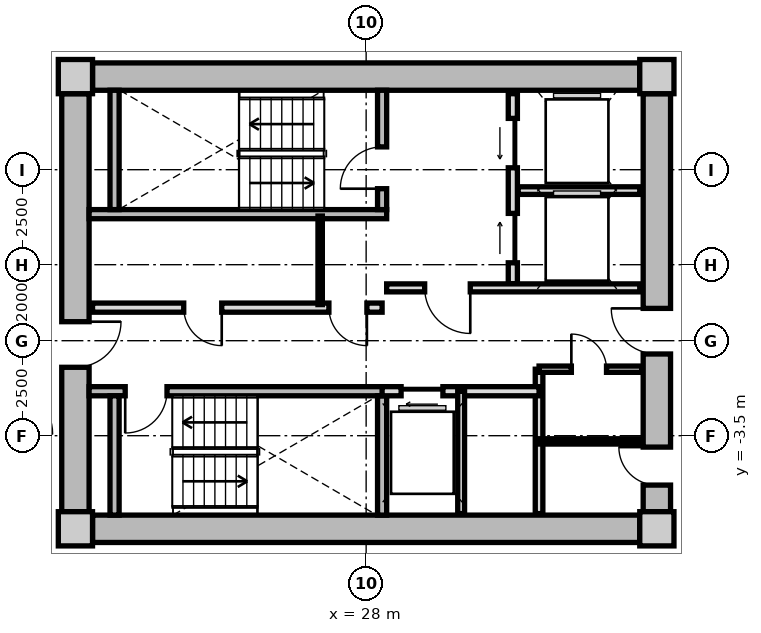
"""IFC4 building model, lengths in metres.
Left out: names, types, materials, properties, quantities, classifications, styles, units other than length and angle.
Written with IfcOpenShell. Run it as: python <this file> out.ifc"""

import sys

from ifc_helpers import new_model, si_unit, direction, frame, frame_2d, origin, origin_2d, place, context, subcontext, project, spatial, rectangle, extrude, source, transform, mapped, element, fill, save


model = new_model("IFC4")
c1 = context("Model", 3, precision=1e-05, world=origin(), true_north=direction((0.0, 1.0)))
c2 = subcontext(c1, "Body", "Model", "MODEL_VIEW")
j1 = project(units=[si_unit("LENGTHUNIT", "METRE"), si_unit("PLANEANGLEUNIT", "RADIAN")], contexts=[c1])
p1 = place(None, origin())
s1 = spatial("IfcSite", under=j1, at=p1, CompositionType="ELEMENT")
p2 = place(p1, origin())
s2 = spatial("IfcBuilding", under=s1, at=p2, CompositionType="ELEMENT")
p3 = place(p2, frame((0.0, 0.0, 114.55)))
s3 = spatial("IfcBuildingStorey", under=s2, at=p3, CompositionType="ELEMENT", Elevation=114.55)
m1 = source(origin(), c2, "Body", "SweptSolid", [
    extrude(rectangle(XDim=0.9, YDim=0.9, at=origin_2d()), origin(), (0.0, 0.0, 1.0), 3.05),
])
for number, where, z_axis, x_axis in (
    (1, (20.35, -5.95, 0.0), (0.0, 0.0, 1.0), (1.0, 0.0, 0.0)),
    (2, (35.65, -5.95, 0.0), (0.0, 0.0, 1.0), (1.0, 0.0, 0.0)),
    (3, (35.65, 5.95, 0.0), (0.0, 0.0, 1.0), (1.0, 0.0, 0.0)),
    (4, (20.35, 5.95, 0.0), (0.0, 0.0, 1.0), (1.0, 0.0, 0.0)),
):
    element("IfcColumn", number, at=place(p3, frame(where, z_axis=z_axis, x_axis=x_axis)), inside=s3, PredefinedType="COLUMN", context=c2, shape_type="MappedRepresentation", body=[
        mapped(m1, transform((0.0, 0.0, 0.0), x_axis=(1.0, 0.0, 0.0), y_axis=(0.0, 1.0, 0.0), z_axis=(0.0, 0.0, 1.0), scale=1.0)),
    ])
m2 = source(origin(), c2, "Body", "SweptSolid", [
    extrude(rectangle(XDim=14.4, YDim=0.72, at=frame_2d((7.2, 0.0))), origin(), (0.0, 0.0, 1.0), 2.79),
])
for number, where, z_axis, x_axis in (
    (5, (20.8, 5.95, 0.0), (0.0, 0.0, 1.0), (1.0, 0.0, 0.0)),
    (6, (35.2, -5.95, 0.0), (0.0, 0.0, 1.0), (-1.0, 0.0, 0.0)),
):
    element("IfcWall", number, at=place(p3, frame(where, z_axis=z_axis, x_axis=x_axis)), inside=s3, PredefinedType="SHEAR", context=c2, shape_type="MappedRepresentation", body=[
        mapped(m2, transform((0.0, 0.0, 0.0), x_axis=(1.0, 0.0, 0.0), y_axis=(0.0, 1.0, 0.0), z_axis=(0.0, 0.0, 1.0), scale=1.0)),
    ])
m3 = source(origin(), c2, "Body", "SweptSolid", [
    extrude(rectangle(XDim=11.0, YDim=0.72, at=frame_2d((5.5, 0.0))), origin(), (0.0, 0.0, 1.0), 2.79),
])
p4 = place(p3, frame((20.35, -5.5, 0.0), z_axis=(0.0, 0.0, 1.0), x_axis=(0.0, 1.0, 0.0)))
e7 = element("IfcWall", 7, at=p4, inside=s3, PredefinedType="SHEAR", context=c2, shape_type="MappedRepresentation", body=[
    mapped(m3, transform((0.0, 0.0, 0.0), x_axis=(1.0, 0.0, 0.0), y_axis=(0.0, 1.0, 0.0), z_axis=(0.0, 0.0, 1.0), scale=1.0)),
])
p5 = place(p4, frame((3.8, 0.0, 0.0)))
e8 = element("IfcOpeningElement", 8, at=p5, cuts=e7, PredefinedType="OPENING", context=c2, shape_type="SweptSolid", body=[
    extrude(rectangle(XDim=1.2, YDim=2.15, at=frame_2d((0.6, 1.075))), frame((0.0, 0.37, 0.0), z_axis=(0.0, -1.0, 0.0), x_axis=(1.0, 0.0, 0.0)), (0.0, 0.0, 1.0), 0.74),
])
p6 = place(p3, frame((35.65, 5.5, 0.0), z_axis=(0.0, 0.0, 1.0), x_axis=(0.0, -1.0, 0.0)))
e9 = element("IfcWall", 9, at=p6, inside=s3, PredefinedType="SHEAR", context=c2, shape_type="MappedRepresentation", body=[
    mapped(m3, transform((0.0, 0.0, 0.0), x_axis=(1.0, 0.0, 0.0), y_axis=(0.0, 1.0, 0.0), z_axis=(0.0, 0.0, 1.0), scale=1.0)),
])
p7 = place(p6, frame((5.65, 0.0, 0.0)))
e10 = element("IfcOpeningElement", 10, at=p7, cuts=e9, PredefinedType="OPENING", context=c2, shape_type="SweptSolid", body=[
    extrude(rectangle(XDim=1.2, YDim=2.15, at=frame_2d((0.6, 1.075))), frame((0.0, 0.37, 0.0), z_axis=(0.0, -1.0, 0.0), x_axis=(1.0, 0.0, 0.0)), (0.0, 0.0, 1.0), 0.74),
])
p8 = place(p6, frame((9.3, 0.0, 0.0)))
e11 = element("IfcOpeningElement", 11, at=p8, cuts=e9, PredefinedType="OPENING", context=c2, shape_type="SweptSolid", body=[
    extrude(rectangle(XDim=1.0, YDim=2.1, at=frame_2d((0.5, 1.05))), frame((0.0, 0.37, 0.0), z_axis=(0.0, -1.0, 0.0), x_axis=(1.0, 0.0, 0.0)), (0.0, 0.0, 1.0), 0.74),
])
m4 = source(origin(), c2, "Body", "SweptSolid", [
    extrude(rectangle(XDim=7.83, YDim=0.24, at=frame_2d((3.915, 0.0))), origin(), (0.0, 0.0, 1.0), 2.79),
])
p9 = place(p3, frame((20.71, 2.33, 0.0), z_axis=(0.0, 0.0, 1.0), x_axis=(1.0, 0.0, 0.0)))
e12 = element("IfcWall", 12, at=p9, inside=s3, PredefinedType="PARTITIONING", context=c2, shape_type="MappedRepresentation", body=[
    mapped(m4, transform((0.0, 0.0, 0.0), x_axis=(1.0, 0.0, 0.0), y_axis=(0.0, 1.0, 0.0), z_axis=(0.0, 0.0, 1.0), scale=1.0)),
])
m5 = source(origin(), c2, "Body", "SweptSolid", [
    extrude(rectangle(XDim=3.14, YDim=0.24, at=frame_2d((1.57, 0.0))), origin(), (0.0, 0.0, 1.0), 2.79),
])
p10 = place(p3, frame((21.38, 2.45, 0.0), z_axis=(0.0, 0.0, 1.0), x_axis=(0.0, 1.0, 0.0)))
e13 = element("IfcWall", 13, at=p10, inside=s3, PredefinedType="PARTITIONING", context=c2, shape_type="MappedRepresentation", body=[
    mapped(m5, transform((0.0, 0.0, 0.0), x_axis=(1.0, 0.0, 0.0), y_axis=(0.0, 1.0, 0.0), z_axis=(0.0, 0.0, 1.0), scale=1.0)),
])
p11 = place(p3, frame((28.42, 2.45, 0.0), z_axis=(0.0, 0.0, 1.0), x_axis=(0.0, 1.0, 0.0)))
e14 = element("IfcWall", 14, at=p11, inside=s3, PredefinedType="PARTITIONING", context=c2, shape_type="MappedRepresentation", body=[
    mapped(m5, transform((0.0, 0.0, 0.0), x_axis=(1.0, 0.0, 0.0), y_axis=(0.0, 1.0, 0.0), z_axis=(0.0, 0.0, 1.0), scale=1.0)),
])
p12 = place(p11, frame((0.55, 0.0, 0.0)))
e15 = element("IfcOpeningElement", 15, at=p12, cuts=e14, PredefinedType="OPENING", context=c2, shape_type="SweptSolid", body=[
    extrude(rectangle(XDim=1.1, YDim=2.15, at=frame_2d((0.55, 1.075))), frame((0.0, 0.13, 0.0), z_axis=(0.0, -1.0, 0.0), x_axis=(1.0, 0.0, 0.0)), (0.0, 0.0, 1.0), 0.26),
])
p13 = place(p3, frame((20.71, -2.33, 0.0), z_axis=(0.0, 0.0, 1.0), x_axis=(1.0, 0.0, 0.0)))
e16 = element("IfcWall", 16, at=p13, inside=s3, PredefinedType="PARTITIONING", context=c2, shape_type="MappedRepresentation", body=[
    mapped(m4, transform((0.0, 0.0, 0.0), x_axis=(1.0, 0.0, 0.0), y_axis=(0.0, 1.0, 0.0), z_axis=(0.0, 0.0, 1.0), scale=1.0)),
])
p14 = place(p13, frame((0.95, 0.0, 0.0)))
e17 = element("IfcOpeningElement", 17, at=p14, cuts=e16, PredefinedType="OPENING", context=c2, shape_type="SweptSolid", body=[
    extrude(rectangle(XDim=1.1, YDim=2.15, at=frame_2d((0.55, 1.075))), frame((0.0, 0.13, 0.0), z_axis=(0.0, -1.0, 0.0), x_axis=(1.0, 0.0, 0.0)), (0.0, 0.0, 1.0), 0.26),
])
for number, where, z_axis, x_axis in (
    (18, (21.38, -5.59, 0.0), (0.0, 0.0, 1.0), (0.0, 1.0, 0.0)),
    (19, (28.42, -5.59, 0.0), (0.0, 0.0, 1.0), (0.0, 1.0, 0.0)),
):
    element("IfcWall", number, at=place(p3, frame(where, z_axis=z_axis, x_axis=x_axis)), inside=s3, PredefinedType="PARTITIONING", context=c2, shape_type="MappedRepresentation", body=[
        mapped(m5, transform((0.0, 0.0, 0.0), x_axis=(1.0, 0.0, 0.0), y_axis=(0.0, 1.0, 0.0), z_axis=(0.0, 0.0, 1.0), scale=1.0)),
    ])
m6 = source(origin(), c2, "Body", "SweptSolid", [
    extrude(rectangle(XDim=5.0, YDim=0.24, at=frame_2d((2.5, 0.0))), origin(), (0.0, 0.0, 1.0), 2.775),
])
p15 = place(p3, frame((31.86, 0.5, 0.0), z_axis=(0.0, 0.0, 1.0), x_axis=(0.0, 1.0, 0.0)))
e20 = element("IfcWall", 20, at=p15, inside=s3, PredefinedType="PARTITIONING", context=c2, shape_type="MappedRepresentation", body=[
    mapped(m6, transform((0.0, 0.0, 0.0), x_axis=(1.0, 0.0, 0.0), y_axis=(0.0, 1.0, 0.0), z_axis=(0.0, 0.0, 1.0), scale=1.0)),
])
p16 = place(p15, frame((3.05, 0.0, 0.0)))
e21 = element("IfcOpeningElement", 21, at=p16, cuts=e20, PredefinedType="OPENING", context=c2, shape_type="SweptSolid", body=[
    extrude(rectangle(XDim=1.3, YDim=2.2, at=frame_2d((0.65, 1.1))), frame((0.0, 0.13, 0.0), z_axis=(0.0, -1.0, 0.0), x_axis=(1.0, 0.0, 0.0)), (0.0, 0.0, 1.0), 0.26),
])
p17 = place(p15, frame((0.55, 0.0, 0.0)))
e22 = element("IfcOpeningElement", 22, at=p17, cuts=e20, PredefinedType="OPENING", context=c2, shape_type="SweptSolid", body=[
    extrude(rectangle(XDim=1.3, YDim=2.2, at=frame_2d((0.65, 1.1))), frame((0.0, 0.13, 0.0), z_axis=(0.0, -1.0, 0.0), x_axis=(1.0, 0.0, 0.0)), (0.0, 0.0, 1.0), 0.26),
])
m7 = source(origin(), c2, "Body", "SweptSolid", [
    extrude(rectangle(XDim=3.2, YDim=0.2, at=frame_2d((1.6, 0.0))), origin(), (0.0, 0.0, 1.0), 2.775),
])
p18 = place(p3, frame((32.0, 2.95, 0.0), z_axis=(0.0, 0.0, 1.0), x_axis=(1.0, 0.0, 0.0)))
e23 = element("IfcWall", 23, at=p18, inside=s3, PredefinedType="PARTITIONING", context=c2, shape_type="MappedRepresentation", body=[
    mapped(m7, transform((0.0, 0.0, 0.0), x_axis=(1.0, 0.0, 0.0), y_axis=(0.0, 1.0, 0.0), z_axis=(0.0, 0.0, 1.0), scale=1.0)),
])
m8 = source(origin(), c2, "Body", "SweptSolid", [
    extrude(rectangle(XDim=6.66, YDim=0.21, at=frame_2d((3.33, 0.0))), origin(), (0.0, 0.0, 1.0), 2.775),
])
p19 = place(p3, frame((28.54, 0.39, 0.0), z_axis=(0.0, 0.0, 1.0), x_axis=(1.0, 0.0, 0.0)))
e24 = element("IfcWall", 24, at=p19, inside=s3, PredefinedType="PARTITIONING", context=c2, shape_type="MappedRepresentation", body=[
    mapped(m8, transform((0.0, 0.0, 0.0), x_axis=(1.0, 0.0, 0.0), y_axis=(0.0, 1.0, 0.0), z_axis=(0.0, 0.0, 1.0), scale=1.0)),
])
p20 = place(p19, frame((1.0, 0.0, 0.0)))
e25 = element("IfcOpeningElement", 25, at=p20, cuts=e24, PredefinedType="OPENING", context=c2, shape_type="SweptSolid", body=[
    extrude(rectangle(XDim=1.2, YDim=2.15, at=frame_2d((0.6, 1.075))), frame((0.0, 0.115, 0.0), z_axis=(0.0, -1.0, 0.0), x_axis=(1.0, 0.0, 0.0)), (0.0, 0.0, 1.0), 0.23),
])
m9 = source(origin(), c2, "Body", "SweptSolid", [
    extrude(rectangle(XDim=7.62, YDim=0.24, at=frame_2d((3.81, 0.0))), origin(), (0.0, 0.0, 1.0), 2.775),
])
p21 = place(p3, frame((20.8, -0.13, 0.0), z_axis=(0.0, 0.0, 1.0), x_axis=(1.0, 0.0, 0.0)))
e26 = element("IfcWall", 26, at=p21, inside=s3, PredefinedType="PARTITIONING", context=c2, shape_type="MappedRepresentation", body=[
    mapped(m9, transform((0.0, 0.0, 0.0), x_axis=(1.0, 0.0, 0.0), y_axis=(0.0, 1.0, 0.0), z_axis=(0.0, 0.0, 1.0), scale=1.0)),
])
p22 = place(p21, frame((6.22, 0.0, 0.0)))
e27 = element("IfcOpeningElement", 27, at=p22, cuts=e26, PredefinedType="OPENING", context=c2, shape_type="SweptSolid", body=[
    extrude(rectangle(XDim=1.0, YDim=2.1, at=frame_2d((0.5, 1.05))), frame((0.0, 0.13, 0.0), z_axis=(0.0, -1.0, 0.0), x_axis=(1.0, 0.0, 0.0)), (0.0, 0.0, 1.0), 0.26),
])
p23 = place(p21, frame((2.4, 0.0, 0.0)))
e28 = element("IfcOpeningElement", 28, at=p23, cuts=e26, PredefinedType="OPENING", context=c2, shape_type="SweptSolid", body=[
    extrude(rectangle(XDim=1.0, YDim=2.1, at=frame_2d((0.5, 1.05))), frame((0.0, 0.13, 0.0), z_axis=(0.0, -1.0, 0.0), x_axis=(1.0, 0.0, 0.0)), (0.0, 0.0, 1.0), 0.26),
])
m10 = source(origin(), c2, "Body", "SweptSolid", [
    extrude(rectangle(XDim=2.33, YDim=0.115, at=frame_2d((1.165, 0.0))), origin(), (0.0, 0.0, 1.0), 2.775),
])
p24 = place(p3, frame((26.79, -0.05, 0.0), z_axis=(0.0, 0.0, 1.0), x_axis=(0.0, 1.0, 0.0)))
e29 = element("IfcWall", 29, at=p24, inside=s3, PredefinedType="PARTITIONING", context=c2, shape_type="MappedRepresentation", body=[
    mapped(m10, transform((0.0, 0.0, 0.0), x_axis=(1.0, 0.0, 0.0), y_axis=(0.0, 1.0, 0.0), z_axis=(0.0, 0.0, 1.0), scale=1.0)),
])
m11 = source(origin(), c2, "Body", "SweptSolid", [
    extrude(rectangle(XDim=3.8, YDim=0.2, at=frame_2d((1.9, 0.0))), origin(), (0.0, 0.0, 1.0), 2.775),
])
p25 = place(p3, frame((32.55, -5.55, 0.0), z_axis=(0.0, 0.0, 1.0), x_axis=(0.0, 1.0, 0.0)))
e30 = element("IfcWall", 30, at=p25, inside=s3, PredefinedType="PARTITIONING", context=c2, shape_type="MappedRepresentation", body=[
    mapped(m11, transform((0.0, 0.0, 0.0), x_axis=(1.0, 0.0, 0.0), y_axis=(0.0, 1.0, 0.0), z_axis=(0.0, 0.0, 1.0), scale=1.0)),
])
m12 = source(origin(), c2, "Body", "SweptSolid", [
    extrude(rectangle(XDim=4.13, YDim=0.24, at=frame_2d((2.065, 0.0))), origin(), (0.0, 0.0, 1.0), 2.775),
])
p26 = place(p3, frame((28.42, -2.33, 0.0), z_axis=(0.0, 0.0, 1.0), x_axis=(1.0, 0.0, 0.0)))
e31 = element("IfcWall", 31, at=p26, inside=s3, PredefinedType="PARTITIONING", context=c2, shape_type="MappedRepresentation", body=[
    mapped(m12, transform((0.0, 0.0, 0.0), x_axis=(1.0, 0.0, 0.0), y_axis=(0.0, 1.0, 0.0), z_axis=(0.0, 0.0, 1.0), scale=1.0)),
])
p27 = place(p26, frame((0.5, 0.0, 0.0)))
e32 = element("IfcOpeningElement", 32, at=p27, cuts=e31, PredefinedType="OPENING", context=c2, shape_type="SweptSolid", body=[
    extrude(rectangle(XDim=1.1, YDim=2.2, at=frame_2d((0.55, 1.1))), frame((0.0, 0.13, 0.0), z_axis=(0.0, -1.0, 0.0), x_axis=(1.0, 0.0, 0.0)), (0.0, 0.0, 1.0), 0.26),
])
m13 = source(origin(), c2, "Body", "SweptSolid", [
    extrude(rectangle(XDim=3.22, YDim=0.18, at=frame_2d((1.61, 0.0))), origin(), (0.0, 0.0, 1.0), 2.775),
])
p28 = place(p3, frame((30.5, -5.55, 0.0), z_axis=(0.0, 0.0, 1.0), x_axis=(0.0, 1.0, 0.0)))
e33 = element("IfcWall", 33, at=p28, inside=s3, PredefinedType="PARTITIONING", context=c2, shape_type="MappedRepresentation", body=[
    mapped(m13, transform((0.0, 0.0, 0.0), x_axis=(1.0, 0.0, 0.0), y_axis=(0.0, 1.0, 0.0), z_axis=(0.0, 0.0, 1.0), scale=1.0)),
])
m14 = source(origin(), c2, "Body", "SweptSolid", [
    extrude(rectangle(XDim=2.7, YDim=0.165, at=frame_2d((1.35, 0.0))), origin(), (0.0, 0.0, 1.0), 2.775),
])
p29 = place(p3, frame((32.55, -1.75, 0.0), z_axis=(0.0, 0.0, 1.0), x_axis=(1.0, 0.0, 0.0)))
e34 = element("IfcWall", 34, at=p29, inside=s3, PredefinedType="PARTITIONING", context=c2, shape_type="MappedRepresentation", body=[
    mapped(m14, transform((0.0, 0.0, 0.0), x_axis=(1.0, 0.0, 0.0), y_axis=(0.0, 1.0, 0.0), z_axis=(0.0, 0.0, 1.0), scale=1.0)),
])
p30 = place(p29, frame((0.85, 0.0, 0.0)))
e35 = element("IfcOpeningElement", 35, at=p30, cuts=e34, PredefinedType="OPENING", context=c2, shape_type="SweptSolid", body=[
    extrude(rectangle(XDim=0.925, YDim=2.1, at=frame_2d((0.462, 1.05))), frame((0.0, 0.093, 0.0), z_axis=(0.0, -1.0, 0.0), x_axis=(1.0, 0.0, 0.0)), (0.0, 0.0, 1.0), 0.185),
])
m15 = source(origin(), c2, "Body", "SweptSolid", [
    extrude(rectangle(XDim=2.7, YDim=0.14, at=frame_2d((1.35, 0.0))), origin(), (0.0, 0.0, 1.0), 2.775),
])
p31 = place(p3, frame((32.55, -3.65, 0.0), z_axis=(0.0, 0.0, 1.0), x_axis=(1.0, 0.0, 0.0)))
e36 = element("IfcWall", 36, at=p31, inside=s3, PredefinedType="PARTITIONING", context=c2, shape_type="MappedRepresentation", body=[
    mapped(m15, transform((0.0, 0.0, 0.0), x_axis=(1.0, 0.0, 0.0), y_axis=(0.0, 1.0, 0.0), z_axis=(0.0, 0.0, 1.0), scale=1.0)),
])
m16 = source(origin(), c2, "Body", "SweptSolid", [
    extrude(rectangle(XDim=1.1, YDim=2.15, at=frame_2d((0.55, 1.075))), frame((0.0, 0.025, 0.0), z_axis=(0.0, -1.0, 0.0), x_axis=(1.0, 0.0, 0.0)), (0.0, 0.0, 1.0), 0.05),
])
p32 = place(p12, origin())
e37 = element("IfcDoor", 37, at=p32, inside=s3, OperationType="SINGLE_SWING_LEFT", PredefinedType="DOOR", context=c2, shape_type="MappedRepresentation", body=[
    mapped(m16, transform((0.0, 0.0, 0.0), x_axis=(1.0, 0.0, 0.0), y_axis=(0.0, 1.0, 0.0), z_axis=(0.0, 0.0, 1.0), scale=1.0)),
])
fill(e15, e37)
p33 = place(p14, frame((1.1, 0.0, 0.0), z_axis=(0.0, 0.0, 1.0), x_axis=(-1.0, 0.0, 0.0)))
e38 = element("IfcDoor", 38, at=p33, inside=s3, OperationType="SINGLE_SWING_RIGHT", PredefinedType="DOOR", context=c2, shape_type="MappedRepresentation", body=[
    mapped(m16, transform((0.0, 0.0, 0.0), x_axis=(1.0, 0.0, 0.0), y_axis=(0.0, 1.0, 0.0), z_axis=(0.0, 0.0, 1.0), scale=1.0)),
])
fill(e17, e38)
m17 = source(origin(), c2, "Body", "SweptSolid", [
    extrude(rectangle(XDim=1.3, YDim=2.2, at=frame_2d((0.65, 1.1))), frame((0.0, 0.025, 0.0), z_axis=(0.0, -1.0, 0.0), x_axis=(1.0, 0.0, 0.0)), (0.0, 0.0, 1.0), 0.05),
])
p34 = place(p16, origin())
e39 = element("IfcDoor", 39, at=p34, inside=s3, OperationType="SLIDING_TO_LEFT", PredefinedType="DOOR", context=c2, shape_type="MappedRepresentation", body=[
    mapped(m17, transform((0.0, 0.0, 0.0), x_axis=(1.0, 0.0, 0.0), y_axis=(0.0, 1.0, 0.0), z_axis=(0.0, 0.0, 1.0), scale=1.0)),
])
fill(e21, e39)
p35 = place(p17, origin())
e40 = element("IfcDoor", 40, at=p35, inside=s3, OperationType="SLIDING_TO_RIGHT", PredefinedType="DOOR", context=c2, shape_type="MappedRepresentation", body=[
    mapped(m17, transform((0.0, 0.0, 0.0), x_axis=(1.0, 0.0, 0.0), y_axis=(0.0, 1.0, 0.0), z_axis=(0.0, 0.0, 1.0), scale=1.0)),
])
fill(e22, e40)
m18 = source(origin(), c2, "Body", "SweptSolid", [
    extrude(rectangle(XDim=1.2, YDim=2.15, at=frame_2d((0.6, 1.075))), frame((0.0, 0.025, 0.0), z_axis=(0.0, -1.0, 0.0), x_axis=(1.0, 0.0, 0.0)), (0.0, 0.0, 1.0), 0.05),
])
p36 = place(p20, frame((1.2, 0.0, 0.0), z_axis=(0.0, 0.0, 1.0), x_axis=(-1.0, 0.0, 0.0)))
e41 = element("IfcDoor", 41, at=p36, inside=s3, OperationType="SINGLE_SWING_LEFT", PredefinedType="DOOR", context=c2, shape_type="MappedRepresentation", body=[
    mapped(m18, transform((0.0, 0.0, 0.0), x_axis=(1.0, 0.0, 0.0), y_axis=(0.0, 1.0, 0.0), z_axis=(0.0, 0.0, 1.0), scale=1.0)),
])
fill(e25, e41)
p37 = place(p5, frame((1.2, 0.0, 0.0), z_axis=(0.0, 0.0, 1.0), x_axis=(-1.0, 0.0, 0.0)))
e42 = element("IfcDoor", 42, at=p37, inside=s3, OperationType="SINGLE_SWING_LEFT", PredefinedType="DOOR", context=c2, shape_type="MappedRepresentation", body=[
    mapped(m18, transform((0.0, 0.0, 0.0), x_axis=(1.0, 0.0, 0.0), y_axis=(0.0, 1.0, 0.0), z_axis=(0.0, 0.0, 1.0), scale=1.0)),
])
fill(e8, e42)
p38 = place(p7, frame((1.2, 0.0, 0.0), z_axis=(0.0, 0.0, 1.0), x_axis=(-1.0, 0.0, 0.0)))
e43 = element("IfcDoor", 43, at=p38, inside=s3, OperationType="SINGLE_SWING_RIGHT", PredefinedType="DOOR", context=c2, shape_type="MappedRepresentation", body=[
    mapped(m18, transform((0.0, 0.0, 0.0), x_axis=(1.0, 0.0, 0.0), y_axis=(0.0, 1.0, 0.0), z_axis=(0.0, 0.0, 1.0), scale=1.0)),
])
fill(e10, e43)
m19 = source(origin(), c2, "Body", "SweptSolid", [
    extrude(rectangle(XDim=1.0, YDim=2.1, at=frame_2d((0.5, 1.05))), frame((0.0, 0.025, 0.0), z_axis=(0.0, -1.0, 0.0), x_axis=(1.0, 0.0, 0.0)), (0.0, 0.0, 1.0), 0.05),
])
p39 = place(p22, frame((1.0, 0.0, 0.0), z_axis=(0.0, 0.0, 1.0), x_axis=(-1.0, 0.0, 0.0)))
e44 = element("IfcDoor", 44, at=p39, inside=s3, OperationType="SINGLE_SWING_LEFT", PredefinedType="DOOR", context=c2, shape_type="MappedRepresentation", body=[
    mapped(m19, transform((0.0, 0.0, 0.0), x_axis=(1.0, 0.0, 0.0), y_axis=(0.0, 1.0, 0.0), z_axis=(0.0, 0.0, 1.0), scale=1.0)),
])
fill(e27, e44)
p40 = place(p23, frame((1.0, 0.0, 0.0), z_axis=(0.0, 0.0, 1.0), x_axis=(-1.0, 0.0, 0.0)))
e45 = element("IfcDoor", 45, at=p40, inside=s3, OperationType="SINGLE_SWING_LEFT", PredefinedType="DOOR", context=c2, shape_type="MappedRepresentation", body=[
    mapped(m19, transform((0.0, 0.0, 0.0), x_axis=(1.0, 0.0, 0.0), y_axis=(0.0, 1.0, 0.0), z_axis=(0.0, 0.0, 1.0), scale=1.0)),
])
fill(e28, e45)
m20 = source(origin(), c2, "Body", "SweptSolid", [
    extrude(rectangle(XDim=1.1, YDim=2.2, at=frame_2d((0.55, 1.1))), frame((0.0, 0.025, 0.0), z_axis=(0.0, -1.0, 0.0), x_axis=(1.0, 0.0, 0.0)), (0.0, 0.0, 1.0), 0.05),
])
p41 = place(p27, frame((1.1, 0.0, 0.0), z_axis=(0.0, 0.0, 1.0), x_axis=(-1.0, 0.0, 0.0)))
e46 = element("IfcDoor", 46, at=p41, inside=s3, OperationType="SLIDING_TO_LEFT", PredefinedType="DOOR", context=c2, shape_type="MappedRepresentation", body=[
    mapped(m20, transform((0.0, 0.0, 0.0), x_axis=(1.0, 0.0, 0.0), y_axis=(0.0, 1.0, 0.0), z_axis=(0.0, 0.0, 1.0), scale=1.0)),
])
fill(e32, e46)
m21 = source(origin(), c2, "Body", "SweptSolid", [
    extrude(rectangle(XDim=0.925, YDim=2.1, at=frame_2d((0.462, 1.05))), frame((0.0, 0.025, 0.0), z_axis=(0.0, -1.0, 0.0), x_axis=(1.0, 0.0, 0.0)), (0.0, 0.0, 1.0), 0.05),
])
p42 = place(p30, origin())
e47 = element("IfcDoor", 47, at=p42, inside=s3, OperationType="SINGLE_SWING_LEFT", PredefinedType="DOOR", context=c2, shape_type="MappedRepresentation", body=[
    mapped(m21, transform((0.0, 0.0, 0.0), x_axis=(1.0, 0.0, 0.0), y_axis=(0.0, 1.0, 0.0), z_axis=(0.0, 0.0, 1.0), scale=1.0)),
])
fill(e35, e47)
p43 = place(p8, frame((1.0, 0.0, 0.0), z_axis=(0.0, 0.0, 1.0), x_axis=(-1.0, 0.0, 0.0)))
e48 = element("IfcDoor", 48, at=p43, inside=s3, OperationType="SINGLE_SWING_RIGHT", PredefinedType="DOOR", context=c2, shape_type="MappedRepresentation", body=[
    mapped(m19, transform((0.0, 0.0, 0.0), x_axis=(1.0, 0.0, 0.0), y_axis=(0.0, 1.0, 0.0), z_axis=(0.0, 0.0, 1.0), scale=1.0)),
])
fill(e11, e48)
save(model, sys.argv[1])
